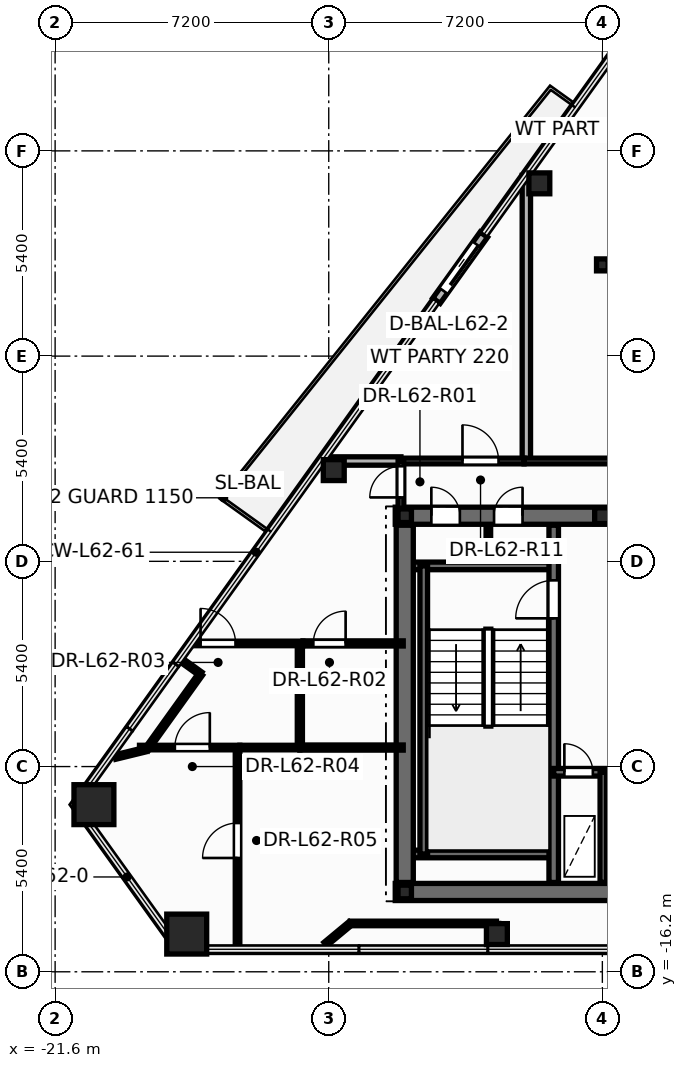
"""IFC4 building model, lengths in metres.
Left out: names, types, materials, properties, quantities, classifications, styles, units other than length and angle.
Written with IfcOpenShell. Run it as: python <this file> out.ifc"""

import sys

from ifc_helpers import new_model, si_unit, direction, frame, frame_2d, origin, origin_2d, place, context, subcontext, project, spatial, rectangle, hollow_rectangle, hollow_circle, i_section, extrude, element, fill, save


model = new_model("IFC4")
c1 = context("Model", 3, precision=1e-05, world=origin(), true_north=direction((0.0, 1.0)))
c2 = subcontext(c1, "Body", "Model", "MODEL_VIEW")
j1 = project(units=[si_unit("LENGTHUNIT", "METRE"), si_unit("PLANEANGLEUNIT", "RADIAN")], contexts=[c1])
p1 = place(None, origin())
s1 = spatial("IfcSite", under=j1, at=p1, CompositionType="ELEMENT")
p2 = place(p1, origin())
s2 = spatial("IfcBuilding", under=s1, at=p2, CompositionType="ELEMENT")
p3 = place(p2, frame((0.0, 0.0, 237.0)))
s3 = spatial("IfcBuildingStorey", under=s2, at=p3, CompositionType="ELEMENT", Elevation=237.0)
for number, where, z_axis, x_axis in (
    (1, (-20.579, -11.802, 0.0), (0.0, 0.0, 1.0), (1.0, 0.0, 0.0)),
    (2, (-18.137, -15.208, 0.0), (0.0, 0.0, 1.0), (1.0, 0.0, 0.0)),
):
    element("IfcColumn", number, at=place(p3, frame(where, z_axis=z_axis, x_axis=x_axis)), inside=s3, PredefinedType="COLUMN", context=c2, shape_type="SweptSolid", body=[
        extrude(hollow_rectangle(XDim=1.05, YDim=1.05, WallThickness=0.045, at=origin_2d()), origin(), (0.0, 0.0, 1.0), 3.6),
    ])
for number, where, z_axis, x_axis in (
    (3, (-9.976, -15.208, 0.0), (0.0, 0.0, 1.0), (1.0, 0.0, 0.0)),
    (4, (-8.858, 4.546, 0.0), (0.0, 0.0, 1.0), (1.0, 0.0, 0.0)),
    (5, (-14.268, -2.999, 0.0), (0.0, 0.0, 1.0), (1.0, 0.0, 0.0)),
):
    element("IfcColumn", number, at=place(p3, frame(where, z_axis=z_axis, x_axis=x_axis)), inside=s3, PredefinedType="COLUMN", context=c2, shape_type="SweptSolid", body=[
        extrude(hollow_circle(Radius=0.275, WallThickness=0.024, at=origin_2d()), origin(), (0.0, 0.0, 1.0), 3.6),
    ])
for number, where, z_axis, x_axis in (
    (6, (-12.4, -14.1, 0.0), (0.0, 0.0, 1.0), (1.0, 0.0, 0.0)),
    (7, (-12.4, -4.2, 0.0), (0.0, 0.0, 1.0), (1.0, 0.0, 0.0)),
):
    element("IfcColumn", number, at=place(p3, frame(where, z_axis=z_axis, x_axis=x_axis)), inside=s3, PredefinedType="COLUMN", context=c2, shape_type="SweptSolid", body=[
        extrude(i_section(OverallWidth=0.352, OverallDepth=0.359, WebThickness=0.018, FlangeThickness=0.026, at=origin_2d()), origin(), (0.0, 0.0, 1.0), 3.6),
    ])
p4 = place(p3, frame((-7.2, -4.2, 0.0), z_axis=(0.0, 0.0, 1.0), x_axis=(1.0, 0.0, 0.0)))
e8 = element("IfcColumn", 8, at=p4, inside=s3, PredefinedType="PILASTER", context=c2, shape_type="SweptSolid", body=[
    extrude(i_section(OverallWidth=0.405, OverallDepth=0.414, WebThickness=0.022, FlangeThickness=0.032, at=origin_2d()), origin(), (0.0, 0.0, 1.0), 3.6),
])
p5 = place(p3, frame((-7.2, 2.4, 0.0), z_axis=(0.0, 0.0, 1.0), x_axis=(1.0, 0.0, 0.0)))
e9 = element("IfcColumn", 9, at=p5, inside=s3, PredefinedType="COLUMN", context=c2, shape_type="SweptSolid", body=[
    extrude(i_section(OverallWidth=0.307, OverallDepth=0.314, WebThickness=0.012, FlangeThickness=0.019, at=origin_2d()), origin(), (0.0, 0.0, 1.0), 3.6),
])
p6 = place(p3, frame((-10.319, 3.196, -0.015), z_axis=(0.0, 0.0, 1.0), x_axis=(-0.582704832398, -0.812683873533, 0.0)))
e10 = element("IfcWall", 10, at=p6, inside=s3, PredefinedType="STANDARD", context=c2, shape_type="SweptSolid", body=[
    extrude(rectangle(XDim=2.14, YDim=0.24, at=frame_2d((1.07, 0.0))), origin(), (0.0, 0.0, 1.0), 2.878),
])
p7 = place(p6, frame((0.32, 0.0, 0.015)))
e11 = element("IfcOpeningElement", 11, at=p7, cuts=e10, PredefinedType="OPENING", context=c2, shape_type="SweptSolid", body=[
    extrude(rectangle(XDim=1.506, YDim=2.204, at=frame_2d((0.75, 1.102))), frame((0.0, 0.13, 0.0), z_axis=(0.0, -1.0, 0.0), x_axis=(1.0, 0.0, 0.0)), (0.0, 0.0, 1.0), 0.26),
])
p8 = place(p3, frame((-10.2, -5.52, 0.0), z_axis=(0.0, 0.0, 1.0), x_axis=(0.0, 1.0, 0.0)))
e12 = element("IfcWall", 12, at=p8, inside=s3, PredefinedType="PARTITIONING", context=c2, shape_type="SweptSolid", body=[
    extrude(rectangle(XDim=1.12, YDim=0.12, at=frame_2d((0.56, 0.0))), origin(), (0.0, 0.0, 1.0), 3.345),
])
p9 = place(p3, frame((-12.65, -14.1, 0.0), z_axis=(0.0, 0.0, 1.0), x_axis=(1.0, 0.0, 0.0)))
e13 = element("IfcWall", 13, at=p9, inside=s3, PredefinedType="SHEAR", context=c2, shape_type="SweptSolid", body=[
    extrude(rectangle(XDim=25.3, YDim=0.45, at=frame_2d((12.65, 0.0))), origin(), (0.0, 0.0, 1.0), 3.6),
])
p10 = place(p3, frame((-12.65, -4.2, 0.0), z_axis=(0.0, 0.0, 1.0), x_axis=(1.0, 0.0, 0.0)))
e14 = element("IfcWall", 14, at=p10, inside=s3, PredefinedType="SHEAR", context=c2, shape_type="SweptSolid", body=[
    extrude(rectangle(XDim=25.3, YDim=0.45, at=frame_2d((12.65, 0.0))), origin(), (0.0, 0.0, 1.0), 3.6),
])
p11 = place(p10, frame((0.95, 0.0, 0.0)))
e15 = element("IfcOpeningElement", 15, at=p11, cuts=e14, PredefinedType="OPENING", context=c2, shape_type="SweptSolid", body=[
    extrude(rectangle(XDim=0.756, YDim=2.054, at=frame_2d((0.375, 1.027))), frame((0.0, 0.235, 0.0), z_axis=(0.0, -1.0, 0.0), x_axis=(1.0, 0.0, 0.0)), (0.0, 0.0, 1.0), 0.47),
])
p12 = place(p10, frame((2.6, 0.0, 0.0)))
e16 = element("IfcOpeningElement", 16, at=p12, cuts=e14, PredefinedType="OPENING", context=c2, shape_type="SweptSolid", body=[
    extrude(rectangle(XDim=0.756, YDim=2.054, at=frame_2d((0.375, 1.027))), frame((0.0, 0.235, 0.0), z_axis=(0.0, -1.0, 0.0), x_axis=(1.0, 0.0, 0.0)), (0.0, 0.0, 1.0), 0.47),
])
p13 = place(p10, frame((21.85, 0.0, 0.0)))
e17 = element("IfcOpeningElement", 17, at=p13, cuts=e14, PredefinedType="OPENING", context=c2, shape_type="SweptSolid", body=[
    extrude(rectangle(XDim=0.756, YDim=2.054, at=frame_2d((0.375, 1.027))), frame((0.0, 0.235, 0.0), z_axis=(0.0, -1.0, 0.0), x_axis=(1.0, 0.0, 0.0)), (0.0, 0.0, 1.0), 0.47),
])
p14 = place(p10, frame((23.5, 0.0, 0.0)))
e18 = element("IfcOpeningElement", 18, at=p14, cuts=e14, PredefinedType="OPENING", context=c2, shape_type="SweptSolid", body=[
    extrude(rectangle(XDim=0.756, YDim=2.054, at=frame_2d((0.375, 1.027))), frame((0.0, 0.235, 0.0), z_axis=(0.0, -1.0, 0.0), x_axis=(1.0, 0.0, 0.0)), (0.0, 0.0, 1.0), 0.47),
])
p15 = place(p10, frame((5.85, 0.0, 0.0)))
e19 = element("IfcOpeningElement", 19, at=p15, cuts=e14, PredefinedType="OPENING", context=c2, shape_type="SweptSolid", body=[
    extrude(rectangle(XDim=1.006, YDim=2.104, at=frame_2d((0.5, 1.052))), frame((0.0, 0.235, 0.0), z_axis=(0.0, -1.0, 0.0), x_axis=(1.0, 0.0, 0.0)), (0.0, 0.0, 1.0), 0.47),
])
p16 = place(p10, frame((10.35, 0.0, 0.0)))
e20 = element("IfcOpeningElement", 20, at=p16, cuts=e14, PredefinedType="OPENING", context=c2, shape_type="SweptSolid", body=[
    extrude(rectangle(XDim=1.406, YDim=2.154, at=frame_2d((0.7, 1.077))), frame((0.0, 0.235, 0.0), z_axis=(0.0, -1.0, 0.0), x_axis=(1.0, 0.0, 0.0)), (0.0, 0.0, 1.0), 0.47),
])
p17 = place(p10, frame((18.45, 0.0, 0.0)))
e21 = element("IfcOpeningElement", 21, at=p17, cuts=e14, PredefinedType="OPENING", context=c2, shape_type="SweptSolid", body=[
    extrude(rectangle(XDim=1.006, YDim=2.104, at=frame_2d((0.5, 1.052))), frame((0.0, 0.235, 0.0), z_axis=(0.0, -1.0, 0.0), x_axis=(1.0, 0.0, 0.0)), (0.0, 0.0, 1.0), 0.47),
])
for number, where, z_axis, x_axis in (
    (22, (-12.35, -5.52, 0.0), (0.0, 0.0, 1.0), (1.0, 0.0, 0.0)),
    (23, (-12.35, -13.1, 0.0), (0.0, 0.0, 1.0), (1.0, 0.0, 0.0)),
):
    element("IfcWall", number, at=place(p3, frame(where, z_axis=z_axis, x_axis=x_axis)), inside=s3, PredefinedType="SOLIDWALL", context=c2, shape_type="SweptSolid", body=[
        extrude(rectangle(XDim=3.87, YDim=0.2, at=frame_2d((1.935, 0.0))), origin(), (0.0, 0.0, 1.0), 3.6),
    ])
p18 = place(p3, frame((-11.9, -13.1, 0.0), z_axis=(0.0, 0.0, 1.0), x_axis=(0.0, 1.0, 0.0)))
e24 = element("IfcWall", 24, at=p18, inside=s3, PredefinedType="SOLIDWALL", context=c2, shape_type="SweptSolid", body=[
    extrude(rectangle(XDim=7.58, YDim=0.2, at=frame_2d((3.79, 0.0))), origin(), (0.0, 0.0, 1.0), 3.6),
])
p19 = place(p3, frame((-8.48, -13.85, 0.0), z_axis=(0.0, 0.0, 1.0), x_axis=(0.0, 1.0, 0.0)))
e25 = element("IfcWall", 25, at=p19, inside=s3, PredefinedType="SHEAR", context=c2, shape_type="SweptSolid", body=[
    extrude(rectangle(XDim=9.4, YDim=0.25, at=frame_2d((4.7, 0.0))), origin(), (0.0, 0.0, 1.0), 3.6),
])
p20 = place(p19, frame((6.95, 0.0, 0.0)))
e26 = element("IfcOpeningElement", 26, at=p20, cuts=e25, PredefinedType="OPENING", context=c2, shape_type="SweptSolid", body=[
    extrude(rectangle(XDim=1.006, YDim=2.104, at=frame_2d((0.5, 1.052))), frame((0.0, 0.135, 0.0), z_axis=(0.0, -1.0, 0.0), x_axis=(1.0, 0.0, 0.0)), (0.0, 0.0, 1.0), 0.27),
])
p21 = place(p3, frame((-8.48, -10.95, 0.0), z_axis=(0.0, 0.0, 1.0), x_axis=(1.0, 0.0, 0.0)))
e27 = element("IfcWall", 27, at=p21, inside=s3, PredefinedType="SOLIDWALL", context=c2, shape_type="SweptSolid", body=[
    extrude(rectangle(XDim=3.36, YDim=0.2, at=frame_2d((1.68, 0.0))), origin(), (0.0, 0.0, 1.0), 3.6),
])
p22 = place(p21, frame((0.28, 0.0, 0.0)))
e28 = element("IfcOpeningElement", 28, at=p22, cuts=e27, PredefinedType="OPENING", context=c2, shape_type="SweptSolid", body=[
    extrude(rectangle(XDim=0.756, YDim=2.054, at=frame_2d((0.375, 1.027))), frame((0.0, 0.11, 0.0), z_axis=(0.0, -1.0, 0.0), x_axis=(1.0, 0.0, 0.0)), (0.0, 0.0, 1.0), 0.22),
])
p23 = place(p21, frame((1.85, 0.0, 0.0)))
e29 = element("IfcOpeningElement", 29, at=p23, cuts=e27, PredefinedType="OPENING", context=c2, shape_type="SweptSolid", body=[
    extrude(rectangle(XDim=1.106, YDim=2.104, at=frame_2d((0.55, 1.052))), frame((0.0, 0.11, 0.0), z_axis=(0.0, -1.0, 0.0), x_axis=(1.0, 0.0, 0.0)), (0.0, 0.0, 1.0), 0.22),
])
p24 = place(p3, frame((-7.18, -13.85, 0.0), z_axis=(0.0, 0.0, 1.0), x_axis=(0.0, 1.0, 0.0)))
e30 = element("IfcWall", 30, at=p24, inside=s3, PredefinedType="PARTITIONING", context=c2, shape_type="SweptSolid", body=[
    extrude(rectangle(XDim=2.9, YDim=0.16, at=frame_2d((1.45, 0.0))), origin(), (0.0, 0.0, 1.0), 2.57),
])
p25 = place(p3, frame((-12.4, -13.85, 0.0), z_axis=(0.0, 0.0, 1.0), x_axis=(0.0, 1.0, 0.0)))
e31 = element("IfcWall", 31, at=p25, inside=s3, PredefinedType="SHEAR", context=c2, shape_type="SweptSolid", body=[
    extrude(rectangle(XDim=9.4, YDim=0.45, at=frame_2d((4.7, 0.0))), origin(), (0.0, 0.0, 1.0), 3.6),
])
p26 = place(p3, frame((-9.2, -2.76, 0.0), z_axis=(0.0, 0.0, 1.0), x_axis=(0.0, 1.0, 0.0)))
e32 = element("IfcWall", 32, at=p26, inside=s3, PredefinedType="PARTITIONING", context=c2, shape_type="SweptSolid", body=[
    extrude(rectangle(XDim=7.516, YDim=0.22, at=frame_2d((3.758, 0.0))), origin(), (0.0, 0.0, 1.0), 2.62),
])
p27 = place(p3, frame((-16.8, -15.608, 0.0), z_axis=(0.0, 0.0, 1.0), x_axis=(0.0, 1.0, 0.0)))
e33 = element("IfcWall", 33, at=p27, inside=s3, PredefinedType="PARTITIONING", context=c2, shape_type="SweptSolid", body=[
    extrude(rectangle(XDim=5.308, YDim=0.12, at=frame_2d((2.654, 0.0))), origin(), (0.0, 0.0, 1.0), 2.863),
])
p28 = place(p27, frame((2.402, 0.0, 0.0)))
e34 = element("IfcOpeningElement", 34, at=p28, cuts=e33, PredefinedType="OPENING", context=c2, shape_type="SweptSolid", body=[
    extrude(rectangle(XDim=0.926, YDim=2.104, at=frame_2d((0.46, 1.052))), frame((0.0, 0.07, 0.0), z_axis=(0.0, -1.0, 0.0), x_axis=(1.0, 0.0, 0.0)), (0.0, 0.0, 1.0), 0.14),
])
p29 = place(p3, frame((-9.26, -2.76, 0.0), z_axis=(0.0, 0.0, 1.0), x_axis=(1.0, 0.0, 0.0)))
e35 = element("IfcWall", 35, at=p29, inside=s3, PredefinedType="PARTITIONING", context=c2, shape_type="SweptSolid", body=[
    extrude(rectangle(XDim=4.82, YDim=0.15, at=frame_2d((2.41, 0.0))), origin(), (0.0, 0.0, 1.0), 2.32),
])
p30 = place(p29, frame((3.431, 0.0, 0.0)))
e36 = element("IfcOpeningElement", 36, at=p30, cuts=e35, PredefinedType="OPENING", context=c2, shape_type="SweptSolid", body=[
    extrude(rectangle(XDim=0.956, YDim=2.104, at=frame_2d((0.475, 1.052))), frame((0.0, 0.085, 0.0), z_axis=(0.0, -1.0, 0.0), x_axis=(1.0, 0.0, 0.0)), (0.0, 0.0, 1.0), 0.17),
])
p31 = place(p3, frame((-13.832, -14.928, 0.0), z_axis=(0.0, 0.0, 1.0), x_axis=(1.0, 0.0, 0.0)))
e37 = element("IfcWall", 37, at=p31, inside=s3, PredefinedType="PARTITIONING", context=c2, shape_type="SweptSolid", body=[
    extrude(rectangle(XDim=3.845, YDim=0.12, at=frame_2d((1.922, 0.0))), origin(), (0.0, 0.0, 1.0), 2.863),
])
p32 = place(p3, frame((-12.5, -2.76, 0.0), z_axis=(0.0, 0.0, 1.0), x_axis=(1.0, 0.0, 0.0)))
e38 = element("IfcWall", 38, at=p32, inside=s3, PredefinedType="PARTITIONING", context=c2, shape_type="SweptSolid", body=[
    extrude(rectangle(XDim=3.238, YDim=0.15, at=frame_2d((1.619, 0.0))), origin(), (0.0, 0.0, 1.0), 3.345),
])
p33 = place(p32, frame((1.619, 0.0, 0.0)))
e39 = element("IfcOpeningElement", 39, at=p33, cuts=e38, PredefinedType="OPENING", context=c2, shape_type="SweptSolid", body=[
    extrude(rectangle(XDim=0.956, YDim=2.104, at=frame_2d((0.475, 1.052))), frame((0.0, 0.085, 0.0), z_axis=(0.0, -1.0, 0.0), x_axis=(1.0, 0.0, 0.0)), (0.0, 0.0, 1.0), 0.17),
])
p34 = place(p3, frame((-18.03, -7.56, 0.0), z_axis=(0.0, 0.0, 1.0), x_axis=(1.0, 0.0, 0.0)))
e40 = element("IfcWall", 40, at=p34, inside=s3, PredefinedType="PARTITIONING", context=c2, shape_type="SweptSolid", body=[
    extrude(rectangle(XDim=2.95, YDim=0.12, at=frame_2d((1.475, 0.0))), origin(), (0.0, 0.0, 1.0), 2.32),
])
p35 = place(p34, frame((0.257, 0.0, 0.0)))
e41 = element("IfcOpeningElement", 41, at=p35, cuts=e40, PredefinedType="OPENING", context=c2, shape_type="SweptSolid", body=[
    extrude(rectangle(XDim=0.926, YDim=2.104, at=frame_2d((0.46, 1.052))), frame((0.0, 0.07, 0.0), z_axis=(0.0, -1.0, 0.0), x_axis=(1.0, 0.0, 0.0)), (0.0, 0.0, 1.0), 0.14),
])
p36 = place(p3, frame((-15.078, -7.56, 0.0), z_axis=(0.0, 0.0, 1.0), x_axis=(1.0, 0.0, 0.0)))
e42 = element("IfcWall", 42, at=p36, inside=s3, PredefinedType="PARTITIONING", context=c2, shape_type="SweptSolid", body=[
    extrude(rectangle(XDim=2.638, YDim=0.135, at=frame_2d((1.319, 0.0))), origin(), (0.0, 0.0, 1.0), 2.863),
])
p37 = place(p36, frame((0.272, 0.0, 0.0)))
e43 = element("IfcOpeningElement", 43, at=p37, cuts=e42, PredefinedType="OPENING", context=c2, shape_type="SweptSolid", body=[
    extrude(rectangle(XDim=0.856, YDim=2.104, at=frame_2d((0.425, 1.052))), frame((0.0, 0.078, 0.0), z_axis=(0.0, -1.0, 0.0), x_axis=(1.0, 0.0, 0.0)), (0.0, 0.0, 1.0), 0.155),
])
p38 = place(p3, frame((-15.16, -10.3, 0.0), z_axis=(0.0, 0.0, 1.0), x_axis=(0.0, 1.0, 0.0)))
e44 = element("IfcWall", 44, at=p38, inside=s3, PredefinedType="PARTITIONING", context=c2, shape_type="SweptSolid", body=[
    extrude(rectangle(XDim=2.74, YDim=0.135, at=frame_2d((1.37, 0.0))), origin(), (0.0, 0.0, 1.0), 3.345),
])
p39 = place(p3, frame((-15.16, -10.3, 0.0), z_axis=(0.0, 0.0, 1.0), x_axis=(1.0, 0.0, 0.0)))
e45 = element("IfcWall", 45, at=p39, inside=s3, PredefinedType="PARTITIONING", context=c2, shape_type="SweptSolid", body=[
    extrude(rectangle(XDim=2.72, YDim=0.135, at=frame_2d((1.36, 0.0))), origin(), (0.0, 0.0, 1.0), 2.863),
])
p40 = place(p3, frame((-19.38, -10.3, 0.0), z_axis=(0.0, 0.0, 1.0), x_axis=(1.0, 0.0, 0.0)))
e46 = element("IfcWall", 46, at=p40, inside=s3, PredefinedType="PARTITIONING", context=c2, shape_type="SweptSolid", body=[
    extrude(rectangle(XDim=2.64, YDim=0.12, at=frame_2d((1.32, 0.0))), origin(), (0.0, 0.0, 1.0), 2.32),
])
p41 = place(p40, frame((0.931, 0.0, 0.0)))
e47 = element("IfcOpeningElement", 47, at=p41, cuts=e46, PredefinedType="OPENING", context=c2, shape_type="SweptSolid", body=[
    extrude(rectangle(XDim=0.926, YDim=2.104, at=frame_2d((0.46, 1.052))), frame((0.0, 0.07, 0.0), z_axis=(0.0, -1.0, 0.0), x_axis=(1.0, 0.0, 0.0)), (0.0, 0.0, 1.0), 0.14),
])
p42 = place(p3, frame((-17.77, -8.364, 0.0), z_axis=(0.0, 0.0, 1.0), x_axis=(-0.582741361536, -0.812657680426, 0.0)))
e48 = element("IfcWall", 48, at=p42, inside=s3, PredefinedType="PARTITIONING", context=c2, shape_type="SweptSolid", body=[
    extrude(rectangle(XDim=2.441, YDim=0.12, at=frame_2d((1.221, 0.0))), origin(), (0.0, 0.0, 1.0), 2.32),
])
p43 = place(p3, frame((-14.588, -2.76, 0.0), z_axis=(0.0, 0.0, 1.0), x_axis=(1.0, 0.0, 0.0)))
e49 = element("IfcWall", 49, at=p43, inside=s3, PredefinedType="PARTITIONING", context=c2, shape_type="SweptSolid", body=[
    extrude(rectangle(XDim=2.088, YDim=0.22, at=frame_2d((1.044, 0.0))), origin(), (0.0, 0.0, 1.0), 2.62),
])
p44 = place(p3, frame((-16.738, -10.3, 0.0), z_axis=(0.0, 0.0, 1.0), x_axis=(1.0, 0.0, 0.0)))
e50 = element("IfcWall", 50, at=p44, inside=s3, PredefinedType="PARTITIONING", context=c2, shape_type="SweptSolid", body=[
    extrude(rectangle(XDim=1.578, YDim=0.12, at=frame_2d((0.789, 0.0))), origin(), (0.0, 0.0, 1.0), 3.345),
])
p45 = place(p3, frame((-12.5, -4.24, 0.0), z_axis=(0.0, 0.0, 1.0), x_axis=(0.0, 1.0, 0.0)))
e51 = element("IfcWall", 51, at=p45, inside=s3, PredefinedType="PARTITIONING", context=c2, shape_type="SweptSolid", body=[
    extrude(rectangle(XDim=1.48, YDim=0.15, at=frame_2d((0.74, 0.0))), origin(), (0.0, 0.0, 1.0), 2.32),
])
p46 = place(p45, frame((0.522, 0.0, 0.0)))
e52 = element("IfcOpeningElement", 52, at=p46, cuts=e51, PredefinedType="OPENING", context=c2, shape_type="SweptSolid", body=[
    extrude(rectangle(XDim=0.826, YDim=2.104, at=frame_2d((0.41, 1.052))), frame((0.0, 0.085, 0.0), z_axis=(0.0, -1.0, 0.0), x_axis=(1.0, 0.0, 0.0)), (0.0, 0.0, 1.0), 0.17),
])
p47 = place(p3, frame((-14.488, -15.472, 0.0), z_axis=(0.0, 0.0, 1.0), x_axis=(0.769534733406, 0.638604959331, 0.0)))
e53 = element("IfcWall", 53, at=p47, inside=s3, PredefinedType="PARTITIONING", context=c2, shape_type="SweptSolid", body=[
    extrude(rectangle(XDim=0.852, YDim=0.12, at=frame_2d((0.426, 0.0))), origin(), (0.0, 0.0, 1.0), 2.863),
])
p48 = place(p3, frame((-19.25, -10.362, 0.0), z_axis=(0.0, 0.0, 1.0), x_axis=(-0.971380053394, -0.237530612486, 0.0)))
e54 = element("IfcWall", 54, at=p48, inside=s3, PredefinedType="PARTITIONING", context=c2, shape_type="SweptSolid", body=[
    extrude(rectangle(XDim=0.792, YDim=0.12, at=frame_2d((0.396, 0.0))), origin(), (0.0, 0.0, 1.0), 2.32),
])
for number, where, z_axis, x_axis in (
    (55, (-18.314, -7.973, 0.0), (0.0, 0.0, 1.0), (0.813, -0.583, 0.0)),
    (56, (-9.987, -14.928, 0.0), (0.0, 0.0, 1.0), (0.0, -1.0, 0.0)),
):
    element("IfcWall", number, at=place(p3, frame(where, z_axis=z_axis, x_axis=x_axis)), inside=s3, PredefinedType="PARTITIONING", context=c2, shape_type="SweptSolid", body=[
        extrude(rectangle(XDim=0.67, YDim=0.12, at=frame_2d((0.335, 0.0))), origin(), (0.0, 0.0, 1.0), 2.863),
    ])
p49 = place(p7, origin())
e57 = element("IfcDoor", 57, at=p49, inside=s3, OperationType="SLIDING_TO_RIGHT", PredefinedType="DOOR", context=c2, shape_type="SweptSolid", body=[
    extrude(rectangle(XDim=1.5, YDim=2.2, at=frame_2d((0.75, 1.1))), frame((0.0, 0.025, 0.0), z_axis=(0.0, -1.0, 0.0), x_axis=(1.0, 0.0, 0.0)), (0.0, 0.0, 1.0), 0.05),
])
fill(e11, e57)
p50 = place(p20, origin())
e58 = element("IfcDoor", 58, at=p50, inside=s3, OperationType="SINGLE_SWING_LEFT", PredefinedType="DOOR", context=c2, shape_type="SweptSolid", body=[
    extrude(rectangle(XDim=1.0, YDim=2.1, at=frame_2d((0.5, 1.05))), frame((0.0, 0.025, 0.0), z_axis=(0.0, -1.0, 0.0), x_axis=(1.0, 0.0, 0.0)), (0.0, 0.0, 1.0), 0.05),
])
fill(e26, e58)
p51 = place(p22, origin())
e59 = element("IfcDoor", 59, at=p51, inside=s3, OperationType="SINGLE_SWING_LEFT", PredefinedType="DOOR", context=c2, shape_type="SweptSolid", body=[
    extrude(rectangle(XDim=0.75, YDim=2.05, at=frame_2d((0.375, 1.025))), frame((0.0, 0.025, 0.0), z_axis=(0.0, -1.0, 0.0), x_axis=(1.0, 0.0, 0.0)), (0.0, 0.0, 1.0), 0.05),
])
fill(e28, e59)
p52 = place(p11, origin())
e60 = element("IfcDoor", 60, at=p52, inside=s3, OperationType="SINGLE_SWING_LEFT", PredefinedType="DOOR", context=c2, shape_type="SweptSolid", body=[
    extrude(rectangle(XDim=0.75, YDim=2.05, at=frame_2d((0.375, 1.025))), frame((0.0, 0.025, 0.0), z_axis=(0.0, -1.0, 0.0), x_axis=(1.0, 0.0, 0.0)), (0.0, 0.0, 1.0), 0.05),
])
fill(e15, e60)
p53 = place(p12, origin())
e61 = element("IfcDoor", 61, at=p53, inside=s3, OperationType="SINGLE_SWING_RIGHT", PredefinedType="DOOR", context=c2, shape_type="SweptSolid", body=[
    extrude(rectangle(XDim=0.75, YDim=2.05, at=frame_2d((0.375, 1.025))), frame((0.0, 0.025, 0.0), z_axis=(0.0, -1.0, 0.0), x_axis=(1.0, 0.0, 0.0)), (0.0, 0.0, 1.0), 0.05),
])
fill(e16, e61)
p54 = place(p46, origin())
e62 = element("IfcDoor", 62, at=p54, inside=s3, OperationType="SINGLE_SWING_LEFT", PredefinedType="DOOR", context=c2, shape_type="SweptSolid", body=[
    extrude(rectangle(XDim=0.82, YDim=2.1, at=frame_2d((0.41, 1.05))), frame((0.0, 0.025, 0.0), z_axis=(0.0, -1.0, 0.0), x_axis=(1.0, 0.0, 0.0)), (0.0, 0.0, 1.0), 0.05),
])
fill(e52, e62)
p55 = place(p37, origin())
e63 = element("IfcDoor", 63, at=p55, inside=s3, OperationType="SINGLE_SWING_RIGHT", PredefinedType="DOOR", context=c2, shape_type="SweptSolid", body=[
    extrude(rectangle(XDim=0.85, YDim=2.1, at=frame_2d((0.425, 1.05))), frame((0.0, 0.025, 0.0), z_axis=(0.0, -1.0, 0.0), x_axis=(1.0, 0.0, 0.0)), (0.0, 0.0, 1.0), 0.05),
])
fill(e43, e63)
p56 = place(p35, origin())
e64 = element("IfcDoor", 64, at=p56, inside=s3, OperationType="SINGLE_SWING_LEFT", PredefinedType="DOOR", context=c2, shape_type="SweptSolid", body=[
    extrude(rectangle(XDim=0.92, YDim=2.1, at=frame_2d((0.46, 1.05))), frame((0.0, 0.025, 0.0), z_axis=(0.0, -1.0, 0.0), x_axis=(1.0, 0.0, 0.0)), (0.0, 0.0, 1.0), 0.05),
])
fill(e41, e64)
p57 = place(p41, origin())
e65 = element("IfcDoor", 65, at=p57, inside=s3, OperationType="SINGLE_SWING_RIGHT", PredefinedType="DOOR", context=c2, shape_type="SweptSolid", body=[
    extrude(rectangle(XDim=0.92, YDim=2.1, at=frame_2d((0.46, 1.05))), frame((0.0, 0.025, 0.0), z_axis=(0.0, -1.0, 0.0), x_axis=(1.0, 0.0, 0.0)), (0.0, 0.0, 1.0), 0.05),
])
fill(e47, e65)
p58 = place(p28, origin())
e66 = element("IfcDoor", 66, at=p58, inside=s3, OperationType="SINGLE_SWING_LEFT", PredefinedType="DOOR", context=c2, shape_type="SweptSolid", body=[
    extrude(rectangle(XDim=0.92, YDim=2.1, at=frame_2d((0.46, 1.05))), frame((0.0, 0.025, 0.0), z_axis=(0.0, -1.0, 0.0), x_axis=(1.0, 0.0, 0.0)), (0.0, 0.0, 1.0), 0.05),
])
fill(e34, e66)
p59 = place(p33, origin())
e67 = element("IfcDoor", 67, at=p59, inside=s3, OperationType="SINGLE_SWING_LEFT", PredefinedType="DOOR", context=c2, shape_type="SweptSolid", body=[
    extrude(rectangle(XDim=0.95, YDim=2.1, at=frame_2d((0.475, 1.05))), frame((0.0, 0.025, 0.0), z_axis=(0.0, -1.0, 0.0), x_axis=(1.0, 0.0, 0.0)), (0.0, 0.0, 1.0), 0.05),
])
fill(e39, e67)
save(model, sys.argv[1])
